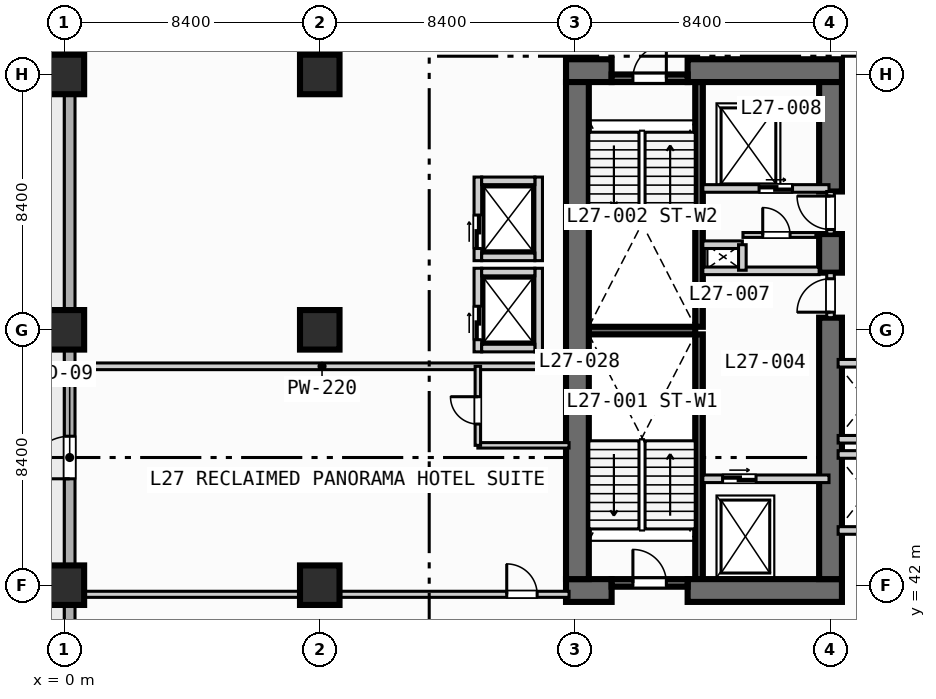
"""IFC4 building model, lengths in metres.
Left out: names, types, materials, properties, quantities, classifications, styles, units other than length and angle.
Written with IfcOpenShell. Run it as: python <this file> out.ifc"""

import sys

from ifc_helpers import new_model, si_unit, direction, frame, frame_2d, origin, origin_2d, place, context, subcontext, project, spatial, rectangle, extrude, element, fill, save


model = new_model("IFC4")
c1 = context("Model", 3, precision=1e-05, world=origin(), true_north=direction((0.0, 1.0)))
c2 = subcontext(c1, "Body", "Model", "MODEL_VIEW")
j1 = project(units=[si_unit("LENGTHUNIT", "METRE"), si_unit("PLANEANGLEUNIT", "RADIAN")], contexts=[c1])
p1 = place(None, origin())
s1 = spatial("IfcSite", under=j1, at=p1, CompositionType="ELEMENT")
p2 = place(p1, origin())
s2 = spatial("IfcBuilding", under=s1, at=p2, CompositionType="ELEMENT")
p3 = place(p2, frame((0.0, 0.0, 115.2)))
s3 = spatial("IfcBuildingStorey", under=s2, at=p3, CompositionType="ELEMENT", Elevation=115.2)
for number, where, z_axis, x_axis in (
    (1, (20.875, 42.2, 0.0), (0.0, 0.0, 1.0), (0.0, 1.0, 0.0)),
    (2, (20.875, 50.5, 0.0), (0.0, 0.0, 1.0), (0.0, 1.0, 0.0)),
):
    element("IfcWall", number, at=place(p3, frame(where, z_axis=z_axis, x_axis=x_axis)), inside=s3, PredefinedType="SOLIDWALL", context=c2, shape_type="SweptSolid", body=[
        extrude(rectangle(XDim=8.05, YDim=0.25, at=frame_2d((4.025, 0.0))), origin(), (0.0, 0.0, 1.0), 3.55),
    ])
p4 = place(p3, frame((17.25, 50.375, 0.0), z_axis=(0.0, 0.0, 1.0), x_axis=(1.0, 0.0, 0.0)))
e3 = element("IfcWall", 3, at=p4, inside=s3, PredefinedType="SOLIDWALL", context=c2, shape_type="SweptSolid", body=[
    extrude(rectangle(XDim=3.5, YDim=0.25, at=frame_2d((1.75, 0.0))), origin(), (0.0, 0.0, 1.0), 3.55),
])
p5 = place(p3, frame((16.5, 41.825, 0.0), z_axis=(0.0, 0.0, 1.0), x_axis=(1.0, 0.0, 0.0)))
e4 = element("IfcWall", 4, at=p5, inside=s3, PredefinedType="SHEAR", context=c2, shape_type="SweptSolid", body=[
    extrude(rectangle(XDim=1.5, YDim=0.75, at=frame_2d((0.75, 0.0))), origin(), (0.0, 0.0, 1.0), 3.55),
])
p6 = place(p3, frame((20.5, 41.825, 0.0), z_axis=(0.0, 0.0, 1.0), x_axis=(1.0, 0.0, 0.0)))
e5 = element("IfcWall", 5, at=p6, inside=s3, PredefinedType="SHEAR", context=c2, shape_type="SweptSolid", body=[
    extrude(rectangle(XDim=5.075, YDim=0.75, at=frame_2d((2.538, 0.0))), origin(), (0.0, 0.0, 1.0), 3.55),
])
p7 = place(p3, frame((16.5, 58.925, 0.0), z_axis=(0.0, 0.0, 1.0), x_axis=(1.0, 0.0, 0.0)))
e6 = element("IfcWall", 6, at=p7, inside=s3, PredefinedType="SHEAR", context=c2, shape_type="SweptSolid", body=[
    extrude(rectangle(XDim=1.5, YDim=0.75, at=frame_2d((0.75, 0.0))), origin(), (0.0, 0.0, 1.0), 3.55),
])
p8 = place(p3, frame((20.5, 58.925, 0.0), z_axis=(0.0, 0.0, 1.0), x_axis=(1.0, 0.0, 0.0)))
e7 = element("IfcWall", 7, at=p8, inside=s3, PredefinedType="SHEAR", context=c2, shape_type="SweptSolid", body=[
    extrude(rectangle(XDim=5.075, YDim=0.75, at=frame_2d((2.538, 0.0))), origin(), (0.0, 0.0, 1.0), 3.55),
])
p9 = place(p3, frame((16.875, 42.2, 0.0), z_axis=(0.0, 0.0, 1.0), x_axis=(0.0, 1.0, 0.0)))
e8 = element("IfcWall", 8, at=p9, inside=s3, PredefinedType="SHEAR", context=c2, shape_type="SweptSolid", body=[
    extrude(rectangle(XDim=16.35, YDim=0.75, at=frame_2d((8.175, 0.0))), origin(), (0.0, 0.0, 1.0), 3.55),
])
p10 = place(p3, frame((25.2, 42.2, 0.0), z_axis=(0.0, 0.0, 1.0), x_axis=(0.0, 1.0, 0.0)))
e9 = element("IfcWall", 9, at=p10, inside=s3, PredefinedType="SHEAR", context=c2, shape_type="SweptSolid", body=[
    extrude(rectangle(XDim=8.6, YDim=0.75, at=frame_2d((4.3, 0.0))), origin(), (0.0, 0.0, 1.0), 3.55),
])
p11 = place(p3, frame((25.2, 52.28, 0.0), z_axis=(0.0, 0.0, 1.0), x_axis=(0.0, 1.0, 0.0)))
e10 = element("IfcWall", 10, at=p11, inside=s3, PredefinedType="SHEAR", context=c2, shape_type="SweptSolid", body=[
    extrude(rectangle(XDim=1.27, YDim=0.75, at=frame_2d((0.635, 0.0))), origin(), (0.0, 0.0, 1.0), 3.55),
])
p12 = place(p3, frame((25.2, 54.95, 0.0), z_axis=(0.0, 0.0, 1.0), x_axis=(0.0, 1.0, 0.0)))
e11 = element("IfcWall", 11, at=p12, inside=s3, PredefinedType="SHEAR", context=c2, shape_type="SweptSolid", body=[
    extrude(rectangle(XDim=3.6, YDim=0.75, at=frame_2d((1.8, 0.0))), origin(), (0.0, 0.0, 1.0), 3.55),
])
for number, where, z_axis, x_axis in (
    (12, (0.0, 42.0, 0.0), (0.0, 0.0, 1.0), (1.0, 0.0, 0.0)),
    (13, (0.0, 50.4, 0.0), (0.0, 0.0, 1.0), (1.0, 0.0, 0.0)),
    (14, (0.0, 58.8, 0.0), (0.0, 0.0, 1.0), (1.0, 0.0, 0.0)),
    (15, (8.4, 42.0, 0.0), (0.0, 0.0, 1.0), (1.0, 0.0, 0.0)),
    (16, (8.4, 50.4, 0.0), (0.0, 0.0, 1.0), (1.0, 0.0, 0.0)),
    (17, (8.4, 58.8, 0.0), (0.0, 0.0, 1.0), (1.0, 0.0, 0.0)),
):
    element("IfcColumn", number, at=place(p3, frame(where, z_axis=z_axis, x_axis=x_axis)), inside=s3, PredefinedType="COLUMN", context=c2, shape_type="SweptSolid", body=[
        extrude(rectangle(XDim=1.3, YDim=1.3, at=origin_2d()), origin(), (0.0, 0.0, 1.0), 3.8),
    ])
p13 = place(p3, frame((0.175, 3.175, 0.0), z_axis=(0.0, 0.0, 1.0), x_axis=(0.0, 1.0, 0.0)))
e18 = element("IfcWall", 18, at=p13, inside=s3, PredefinedType="STANDARD", context=c2, shape_type="SweptSolid", body=[
    extrude(rectangle(XDim=86.05, YDim=0.35, at=frame_2d((43.025, 0.0))), origin(), (0.0, 0.0, 1.0), 3.55),
])
p14 = place(p13, frame((42.325, 0.0, 0.0)))
e19 = element("IfcOpeningElement", 19, at=p14, cuts=e18, PredefinedType="OPENING", context=c2, shape_type="SweptSolid", body=[
    extrude(rectangle(XDim=1.4, YDim=2.2, at=frame_2d((0.7, 1.1))), frame((0.0, 0.185, 0.0), z_axis=(0.0, -1.0, 0.0), x_axis=(1.0, 0.0, 0.0)), (0.0, 0.0, 1.0), 0.37),
])
p15 = place(p13, frame((33.525, 0.0, 0.85)))
e20 = element("IfcOpeningElement", 20, at=p15, cuts=e18, PredefinedType="OPENING", context=c2, shape_type="SweptSolid", body=[
    extrude(rectangle(XDim=2.2, YDim=1.8, at=frame_2d((1.1, 0.9))), frame((0.0, 0.185, 0.0), z_axis=(0.0, -1.0, 0.0), x_axis=(1.0, 0.0, 0.0)), (0.0, 0.0, 1.0), 0.37),
])
p16 = place(p13, frame((22.775, 0.0, 0.85)))
e21 = element("IfcOpeningElement", 21, at=p16, cuts=e18, PredefinedType="OPENING", context=c2, shape_type="SweptSolid", body=[
    extrude(rectangle(XDim=1.8, YDim=1.8, at=frame_2d((0.9, 0.9))), frame((0.0, 0.185, 0.0), z_axis=(0.0, -1.0, 0.0), x_axis=(1.0, 0.0, 0.0)), (0.0, 0.0, 1.0), 0.37),
])
p17 = place(p13, frame((27.625, 0.0, 0.85)))
e22 = element("IfcOpeningElement", 22, at=p17, cuts=e18, PredefinedType="OPENING", context=c2, shape_type="SweptSolid", body=[
    extrude(rectangle(XDim=1.8, YDim=1.8, at=frame_2d((0.9, 0.9))), frame((0.0, 0.185, 0.0), z_axis=(0.0, -1.0, 0.0), x_axis=(1.0, 0.0, 0.0)), (0.0, 0.0, 1.0), 0.37),
])
p18 = place(p3, frame((18.0, 42.075, 0.0), z_axis=(0.0, 0.0, 1.0), x_axis=(1.0, 0.0, 0.0)))
e23 = element("IfcWall", 23, at=p18, inside=s3, PredefinedType="SOLIDWALL", context=c2, shape_type="SweptSolid", body=[
    extrude(rectangle(XDim=2.5, YDim=0.25, at=frame_2d((1.25, 0.0))), origin(), (0.0, 0.0, 1.0), 3.55),
])
p19 = place(p18, frame((0.7, 0.0, 0.0)))
e24 = element("IfcOpeningElement", 24, at=p19, cuts=e23, PredefinedType="OPENING", context=c2, shape_type="SweptSolid", body=[
    extrude(rectangle(XDim=1.1, YDim=2.15, at=frame_2d((0.55, 1.075))), frame((0.0, 0.135, 0.0), z_axis=(0.0, -1.0, 0.0), x_axis=(1.0, 0.0, 0.0)), (0.0, 0.0, 1.0), 0.27),
])
p20 = place(p3, frame((18.0, 58.675, 0.0), z_axis=(0.0, 0.0, 1.0), x_axis=(1.0, 0.0, 0.0)))
e25 = element("IfcWall", 25, at=p20, inside=s3, PredefinedType="SOLIDWALL", context=c2, shape_type="SweptSolid", body=[
    extrude(rectangle(XDim=2.5, YDim=0.25, at=frame_2d((1.25, 0.0))), origin(), (0.0, 0.0, 1.0), 3.55),
])
p21 = place(p20, frame((0.7, 0.0, 0.0)))
e26 = element("IfcOpeningElement", 26, at=p21, cuts=e25, PredefinedType="OPENING", context=c2, shape_type="SweptSolid", body=[
    extrude(rectangle(XDim=1.1, YDim=2.15, at=frame_2d((0.55, 1.075))), frame((0.0, 0.135, 0.0), z_axis=(0.0, -1.0, 0.0), x_axis=(1.0, 0.0, 0.0)), (0.0, 0.0, 1.0), 0.27),
])
p22 = place(p3, frame((21.0, 45.5, 0.0), z_axis=(0.0, 0.0, 1.0), x_axis=(1.0, 0.0, 0.0)))
e27 = element("IfcWall", 27, at=p22, inside=s3, PredefinedType="SOLIDWALL", context=c2, shape_type="SweptSolid", body=[
    extrude(rectangle(XDim=4.15, YDim=0.25, at=frame_2d((2.075, 0.0))), origin(), (0.0, 0.0, 1.0), 3.55),
])
p23 = place(p22, frame((0.65, 0.0, 0.0)))
e28 = element("IfcOpeningElement", 28, at=p23, cuts=e27, PredefinedType="OPENING", context=c2, shape_type="SweptSolid", body=[
    extrude(rectangle(XDim=1.1, YDim=2.15, at=frame_2d((0.55, 1.075))), frame((0.0, 0.135, 0.0), z_axis=(0.0, -1.0, 0.0), x_axis=(1.0, 0.0, 0.0)), (0.0, 0.0, 1.0), 0.27),
])
p24 = place(p3, frame((25.2, 50.8, 0.0), z_axis=(0.0, 0.0, 1.0), x_axis=(0.0, 1.0, 0.0)))
e29 = element("IfcWall", 29, at=p24, inside=s3, PredefinedType="SOLIDWALL", context=c2, shape_type="SweptSolid", body=[
    extrude(rectangle(XDim=1.48, YDim=0.25, at=frame_2d((0.74, 0.0))), origin(), (0.0, 0.0, 1.0), 3.55),
])
p25 = place(p24, frame((0.18, 0.0, 0.0)))
e30 = element("IfcOpeningElement", 30, at=p25, cuts=e29, PredefinedType="OPENING", context=c2, shape_type="SweptSolid", body=[
    extrude(rectangle(XDim=1.1, YDim=2.15, at=frame_2d((0.55, 1.075))), frame((0.0, 0.135, 0.0), z_axis=(0.0, -1.0, 0.0), x_axis=(1.0, 0.0, 0.0)), (0.0, 0.0, 1.0), 0.27),
])
p26 = place(p3, frame((21.0, 52.34, 0.0), z_axis=(0.0, 0.0, 1.0), x_axis=(1.0, 0.0, 0.0)))
e31 = element("IfcWall", 31, at=p26, inside=s3, PredefinedType="SOLIDWALL", context=c2, shape_type="SweptSolid", body=[
    extrude(rectangle(XDim=3.825, YDim=0.25, at=frame_2d((1.913, 0.0))), origin(), (0.0, 0.0, 1.0), 3.55),
])
p27 = place(p3, frame((21.0, 55.05, 0.0), z_axis=(0.0, 0.0, 1.0), x_axis=(1.0, 0.0, 0.0)))
e32 = element("IfcWall", 32, at=p27, inside=s3, PredefinedType="SOLIDWALL", context=c2, shape_type="SweptSolid", body=[
    extrude(rectangle(XDim=4.15, YDim=0.25, at=frame_2d((2.075, 0.0))), origin(), (0.0, 0.0, 1.0), 3.55),
])
p28 = place(p27, frame((1.85, 0.0, 0.0)))
e33 = element("IfcOpeningElement", 33, at=p28, cuts=e32, PredefinedType="OPENING", context=c2, shape_type="SweptSolid", body=[
    extrude(rectangle(XDim=1.1, YDim=2.15, at=frame_2d((0.55, 1.075))), frame((0.0, 0.135, 0.0), z_axis=(0.0, -1.0, 0.0), x_axis=(1.0, 0.0, 0.0)), (0.0, 0.0, 1.0), 0.27),
])
p29 = place(p3, frame((25.2, 53.55, 0.0), z_axis=(0.0, 0.0, 1.0), x_axis=(0.0, 1.0, 0.0)))
e34 = element("IfcWall", 34, at=p29, inside=s3, PredefinedType="SOLIDWALL", context=c2, shape_type="SweptSolid", body=[
    extrude(rectangle(XDim=1.4, YDim=0.25, at=frame_2d((0.7, 0.0))), origin(), (0.0, 0.0, 1.0), 3.55),
])
p30 = place(p29, frame((0.15, 0.0, 0.0)))
e35 = element("IfcOpeningElement", 35, at=p30, cuts=e34, PredefinedType="OPENING", context=c2, shape_type="SweptSolid", body=[
    extrude(rectangle(XDim=1.1, YDim=2.15, at=frame_2d((0.55, 1.075))), frame((0.0, 0.135, 0.0), z_axis=(0.0, -1.0, 0.0), x_axis=(1.0, 0.0, 0.0)), (0.0, 0.0, 1.0), 0.27),
])
p31 = place(p3, frame((21.0, 53.2, 0.0), z_axis=(0.0, 0.0, 1.0), x_axis=(1.0, 0.0, 0.0)))
e36 = element("IfcWall", 36, at=p31, inside=s3, PredefinedType="SOLIDWALL", context=c2, shape_type="SweptSolid", body=[
    extrude(rectangle(XDim=1.3, YDim=0.25, at=frame_2d((0.65, 0.0))), origin(), (0.0, 0.0, 1.0), 3.55),
])
p32 = place(p3, frame((22.3, 52.36, 0.0), z_axis=(0.0, 0.0, 1.0), x_axis=(0.0, 1.0, 0.0)))
e37 = element("IfcWall", 37, at=p32, inside=s3, PredefinedType="SOLIDWALL", context=c2, shape_type="SweptSolid", body=[
    extrude(rectangle(XDim=0.84, YDim=0.25, at=frame_2d((0.42, 0.0))), origin(), (0.0, 0.0, 1.0), 3.55),
])
p33 = place(p3, frame((22.32, 53.52, 0.0), z_axis=(0.0, 0.0, 1.0), x_axis=(1.0, 0.0, 0.0)))
e38 = element("IfcWall", 38, at=p33, inside=s3, PredefinedType="PARTITIONING", context=c2, shape_type="SweptSolid", body=[
    extrude(rectangle(XDim=2.4, YDim=0.16, at=frame_2d((1.2, 0.0))), origin(), (0.0, 0.0, 1.0), 3.55),
])
p34 = place(p33, frame((0.65, 0.0, 0.0)))
e39 = element("IfcOpeningElement", 39, at=p34, cuts=e38, PredefinedType="OPENING", context=c2, shape_type="SweptSolid", body=[
    extrude(rectangle(XDim=0.9, YDim=2.1, at=frame_2d((0.45, 1.05))), frame((0.0, 0.09, 0.0), z_axis=(0.0, -1.0, 0.0), x_axis=(1.0, 0.0, 0.0)), (0.0, 0.0, 1.0), 0.18),
])
p35 = place(p3, frame((13.6, 49.675, 0.0), z_axis=(0.0, 0.0, 1.0), x_axis=(0.0, 1.0, 0.0)))
e40 = element("IfcWall", 40, at=p35, inside=s3, PredefinedType="SOLIDWALL", context=c2, shape_type="SweptSolid", body=[
    extrude(rectangle(XDim=2.75, YDim=0.25, at=frame_2d((1.375, 0.0))), origin(), (0.0, 0.0, 1.0), 3.55),
])
p36 = place(p35, frame((0.4, 0.0, 0.0)))
e41 = element("IfcOpeningElement", 41, at=p36, cuts=e40, PredefinedType="OPENING", context=c2, shape_type="SweptSolid", body=[
    extrude(rectangle(XDim=1.1, YDim=2.15, at=frame_2d((0.55, 1.075))), frame((0.0, 0.135, 0.0), z_axis=(0.0, -1.0, 0.0), x_axis=(1.0, 0.0, 0.0)), (0.0, 0.0, 1.0), 0.27),
])
p37 = place(p3, frame((15.6, 49.675, 0.0), z_axis=(0.0, 0.0, 1.0), x_axis=(0.0, 1.0, 0.0)))
e42 = element("IfcWall", 42, at=p37, inside=s3, PredefinedType="SOLIDWALL", context=c2, shape_type="SweptSolid", body=[
    extrude(rectangle(XDim=2.75, YDim=0.25, at=frame_2d((1.375, 0.0))), origin(), (0.0, 0.0, 1.0), 3.55),
])
for number, where, z_axis, x_axis in (
    (43, (13.725, 49.8, 0.0), (0.0, 0.0, 1.0), (1.0, 0.0, 0.0)),
    (44, (13.725, 52.3, 0.0), (0.0, 0.0, 1.0), (1.0, 0.0, 0.0)),
):
    element("IfcWall", number, at=place(p3, frame(where, z_axis=z_axis, x_axis=x_axis)), inside=s3, PredefinedType="SOLIDWALL", context=c2, shape_type="SweptSolid", body=[
        extrude(rectangle(XDim=1.75, YDim=0.25, at=frame_2d((0.875, 0.0))), origin(), (0.0, 0.0, 1.0), 3.55),
    ])
p38 = place(p3, frame((13.6, 52.675, 0.0), z_axis=(0.0, 0.0, 1.0), x_axis=(0.0, 1.0, 0.0)))
e45 = element("IfcWall", 45, at=p38, inside=s3, PredefinedType="SOLIDWALL", context=c2, shape_type="SweptSolid", body=[
    extrude(rectangle(XDim=2.75, YDim=0.25, at=frame_2d((1.375, 0.0))), origin(), (0.0, 0.0, 1.0), 3.55),
])
p39 = place(p38, frame((0.4, 0.0, 0.0)))
e46 = element("IfcOpeningElement", 46, at=p39, cuts=e45, PredefinedType="OPENING", context=c2, shape_type="SweptSolid", body=[
    extrude(rectangle(XDim=1.1, YDim=2.15, at=frame_2d((0.55, 1.075))), frame((0.0, 0.135, 0.0), z_axis=(0.0, -1.0, 0.0), x_axis=(1.0, 0.0, 0.0)), (0.0, 0.0, 1.0), 0.27),
])
p40 = place(p3, frame((15.6, 52.675, 0.0), z_axis=(0.0, 0.0, 1.0), x_axis=(0.0, 1.0, 0.0)))
e47 = element("IfcWall", 47, at=p40, inside=s3, PredefinedType="SOLIDWALL", context=c2, shape_type="SweptSolid", body=[
    extrude(rectangle(XDim=2.75, YDim=0.25, at=frame_2d((1.375, 0.0))), origin(), (0.0, 0.0, 1.0), 3.55),
])
for number, where, z_axis, x_axis in (
    (48, (13.725, 52.8, 0.0), (0.0, 0.0, 1.0), (1.0, 0.0, 0.0)),
    (49, (13.725, 55.3, 0.0), (0.0, 0.0, 1.0), (1.0, 0.0, 0.0)),
):
    element("IfcWall", number, at=place(p3, frame(where, z_axis=z_axis, x_axis=x_axis)), inside=s3, PredefinedType="SOLIDWALL", context=c2, shape_type="SweptSolid", body=[
        extrude(rectangle(XDim=1.75, YDim=0.25, at=frame_2d((0.875, 0.0))), origin(), (0.0, 0.0, 1.0), 3.55),
    ])
for number, where, z_axis, x_axis in (
    (50, (25.45, 43.8, 0.0), (0.0, 0.0, 1.0), (1.0, 0.0, 0.0)),
    (51, (25.45, 46.3, 0.0), (0.0, 0.0, 1.0), (1.0, 0.0, 0.0)),
    (52, (25.45, 46.8, 0.0), (0.0, 0.0, 1.0), (1.0, 0.0, 0.0)),
    (53, (25.45, 49.3, 0.0), (0.0, 0.0, 1.0), (1.0, 0.0, 0.0)),
):
    element("IfcWall", number, at=place(p3, frame(where, z_axis=z_axis, x_axis=x_axis)), inside=s3, PredefinedType="SOLIDWALL", context=c2, shape_type="SweptSolid", body=[
        extrude(rectangle(XDim=1.825, YDim=0.25, at=frame_2d((0.913, 0.0))), origin(), (0.0, 0.0, 1.0), 3.55),
    ])
p41 = place(p3, frame((0.35, 41.7, 0.0), z_axis=(0.0, 0.0, 1.0), x_axis=(1.0, 0.0, 0.0)))
e54 = element("IfcWall", 54, at=p41, inside=s3, PredefinedType="PARTITIONING", context=c2, shape_type="SweptSolid", body=[
    extrude(rectangle(XDim=16.25, YDim=0.2, at=frame_2d((8.125, 0.0))), origin(), (0.0, 0.0, 1.0), 2.8),
])
p42 = place(p41, frame((14.2, 0.0, 0.0)))
e55 = element("IfcOpeningElement", 55, at=p42, cuts=e54, PredefinedType="OPENING", context=c2, shape_type="SweptSolid", body=[
    extrude(rectangle(XDim=1.0, YDim=2.15, at=frame_2d((0.5, 1.075))), frame((0.0, 0.11, 0.0), z_axis=(0.0, -1.0, 0.0), x_axis=(1.0, 0.0, 0.0)), (0.0, 0.0, 1.0), 0.22),
])
p43 = place(p3, frame((0.35, 49.2, 0.0), z_axis=(0.0, 0.0, 1.0), x_axis=(1.0, 0.0, 0.0)))
e56 = element("IfcWall", 56, at=p43, inside=s3, PredefinedType="PARTITIONING", context=c2, shape_type="SweptSolid", body=[
    extrude(rectangle(XDim=16.25, YDim=0.22, at=frame_2d((8.125, 0.0))), origin(), (0.0, 0.0, 1.0), 3.55),
])
p44 = place(p3, frame((13.6, 46.6, 0.0), z_axis=(0.0, 0.0, 1.0), x_axis=(1.0, 0.0, 0.0)))
e57 = element("IfcWall", 57, at=p44, inside=s3, PredefinedType="PLUMBINGWALL", context=c2, shape_type="SweptSolid", body=[
    extrude(rectangle(XDim=3.0, YDim=0.18, at=frame_2d((1.5, 0.0))), origin(), (0.0, 0.0, 1.0), 3.55),
])
p45 = place(p3, frame((13.6, 46.6, 0.0), z_axis=(0.0, 0.0, 1.0), x_axis=(0.0, 1.0, 0.0)))
e58 = element("IfcWall", 58, at=p45, inside=s3, PredefinedType="PLUMBINGWALL", context=c2, shape_type="SweptSolid", body=[
    extrude(rectangle(XDim=2.6, YDim=0.18, at=frame_2d((1.3, 0.0))), origin(), (0.0, 0.0, 1.0), 3.55),
])
p46 = place(p45, frame((0.7, 0.0, 0.0)))
e59 = element("IfcOpeningElement", 59, at=p46, cuts=e58, PredefinedType="OPENING", context=c2, shape_type="SweptSolid", body=[
    extrude(rectangle(XDim=0.9, YDim=2.1, at=frame_2d((0.45, 1.05))), frame((0.0, 0.1, 0.0), z_axis=(0.0, -1.0, 0.0), x_axis=(1.0, 0.0, 0.0)), (0.0, 0.0, 1.0), 0.2),
])
p47 = place(p14, origin())
e60 = element("IfcDoor", 60, at=p47, inside=s3, OperationType="SINGLE_SWING_LEFT", PredefinedType="DOOR", context=c2, shape_type="SweptSolid", body=[
    extrude(rectangle(XDim=1.4, YDim=2.2, at=frame_2d((0.7, 1.1))), frame((0.0, 0.025, 0.0), z_axis=(0.0, -1.0, 0.0), x_axis=(1.0, 0.0, 0.0)), (0.0, 0.0, 1.0), 0.05),
])
fill(e19, e60)
p48 = place(p19, origin())
e61 = element("IfcDoor", 61, at=p48, inside=s3, OperationType="SINGLE_SWING_LEFT", PredefinedType="DOOR", context=c2, shape_type="SweptSolid", body=[
    extrude(rectangle(XDim=1.1, YDim=2.15, at=frame_2d((0.55, 1.075))), frame((0.0, 0.025, 0.0), z_axis=(0.0, -1.0, 0.0), x_axis=(1.0, 0.0, 0.0)), (0.0, 0.0, 1.0), 0.05),
])
fill(e24, e61)
p49 = place(p21, origin())
e62 = element("IfcDoor", 62, at=p49, inside=s3, OperationType="SINGLE_SWING_RIGHT", PredefinedType="DOOR", context=c2, shape_type="SweptSolid", body=[
    extrude(rectangle(XDim=1.1, YDim=2.15, at=frame_2d((0.55, 1.075))), frame((0.0, 0.025, 0.0), z_axis=(0.0, -1.0, 0.0), x_axis=(1.0, 0.0, 0.0)), (0.0, 0.0, 1.0), 0.05),
])
fill(e26, e62)
p50 = place(p23, origin())
e63 = element("IfcDoor", 63, at=p50, inside=s3, OperationType="SLIDING_TO_LEFT", PredefinedType="DOOR", context=c2, shape_type="SweptSolid", body=[
    extrude(rectangle(XDim=1.1, YDim=2.15, at=frame_2d((0.55, 1.075))), frame((0.0, 0.025, 0.0), z_axis=(0.0, -1.0, 0.0), x_axis=(1.0, 0.0, 0.0)), (0.0, 0.0, 1.0), 0.05),
])
fill(e28, e63)
p51 = place(p25, origin())
e64 = element("IfcDoor", 64, at=p51, inside=s3, OperationType="SINGLE_SWING_LEFT", PredefinedType="DOOR", context=c2, shape_type="SweptSolid", body=[
    extrude(rectangle(XDim=1.1, YDim=2.15, at=frame_2d((0.55, 1.075))), frame((0.0, 0.025, 0.0), z_axis=(0.0, -1.0, 0.0), x_axis=(1.0, 0.0, 0.0)), (0.0, 0.0, 1.0), 0.05),
])
fill(e30, e64)
p52 = place(p28, origin())
e65 = element("IfcDoor", 65, at=p52, inside=s3, OperationType="SLIDING_TO_LEFT", PredefinedType="DOOR", context=c2, shape_type="SweptSolid", body=[
    extrude(rectangle(XDim=1.1, YDim=2.15, at=frame_2d((0.55, 1.075))), frame((0.0, 0.025, 0.0), z_axis=(0.0, -1.0, 0.0), x_axis=(1.0, 0.0, 0.0)), (0.0, 0.0, 1.0), 0.05),
])
fill(e33, e65)
p53 = place(p30, origin())
e66 = element("IfcDoor", 66, at=p53, inside=s3, OperationType="SINGLE_SWING_RIGHT", PredefinedType="DOOR", context=c2, shape_type="SweptSolid", body=[
    extrude(rectangle(XDim=1.1, YDim=2.15, at=frame_2d((0.55, 1.075))), frame((0.0, 0.025, 0.0), z_axis=(0.0, -1.0, 0.0), x_axis=(1.0, 0.0, 0.0)), (0.0, 0.0, 1.0), 0.05),
])
fill(e35, e66)
p54 = place(p34, origin())
e67 = element("IfcDoor", 67, at=p54, inside=s3, OperationType="SINGLE_SWING_LEFT", PredefinedType="DOOR", context=c2, shape_type="SweptSolid", body=[
    extrude(rectangle(XDim=0.9, YDim=2.1, at=frame_2d((0.45, 1.05))), frame((0.0, 0.025, 0.0), z_axis=(0.0, -1.0, 0.0), x_axis=(1.0, 0.0, 0.0)), (0.0, 0.0, 1.0), 0.05),
])
fill(e39, e67)
p55 = place(p36, origin())
e68 = element("IfcDoor", 68, at=p55, inside=s3, OperationType="SLIDING_TO_LEFT", PredefinedType="DOOR", context=c2, shape_type="SweptSolid", body=[
    extrude(rectangle(XDim=1.1, YDim=2.15, at=frame_2d((0.55, 1.075))), frame((0.0, 0.025, 0.0), z_axis=(0.0, -1.0, 0.0), x_axis=(1.0, 0.0, 0.0)), (0.0, 0.0, 1.0), 0.05),
])
fill(e41, e68)
p56 = place(p39, origin())
e69 = element("IfcDoor", 69, at=p56, inside=s3, OperationType="SLIDING_TO_LEFT", PredefinedType="DOOR", context=c2, shape_type="SweptSolid", body=[
    extrude(rectangle(XDim=1.1, YDim=2.15, at=frame_2d((0.55, 1.075))), frame((0.0, 0.025, 0.0), z_axis=(0.0, -1.0, 0.0), x_axis=(1.0, 0.0, 0.0)), (0.0, 0.0, 1.0), 0.05),
])
fill(e46, e69)
p57 = place(p42, origin())
e70 = element("IfcDoor", 70, at=p57, inside=s3, OperationType="SINGLE_SWING_LEFT", PredefinedType="DOOR", context=c2, shape_type="SweptSolid", body=[
    extrude(rectangle(XDim=1.0, YDim=2.15, at=frame_2d((0.5, 1.075))), frame((0.0, 0.025, 0.0), z_axis=(0.0, -1.0, 0.0), x_axis=(1.0, 0.0, 0.0)), (0.0, 0.0, 1.0), 0.05),
])
fill(e55, e70)
p58 = place(p46, origin())
e71 = element("IfcDoor", 71, at=p58, inside=s3, OperationType="SINGLE_SWING_RIGHT", PredefinedType="DOOR", context=c2, shape_type="SweptSolid", body=[
    extrude(rectangle(XDim=0.9, YDim=2.1, at=frame_2d((0.45, 1.05))), frame((0.0, 0.025, 0.0), z_axis=(0.0, -1.0, 0.0), x_axis=(1.0, 0.0, 0.0)), (0.0, 0.0, 1.0), 0.05),
])
fill(e59, e71)
save(model, sys.argv[1])
